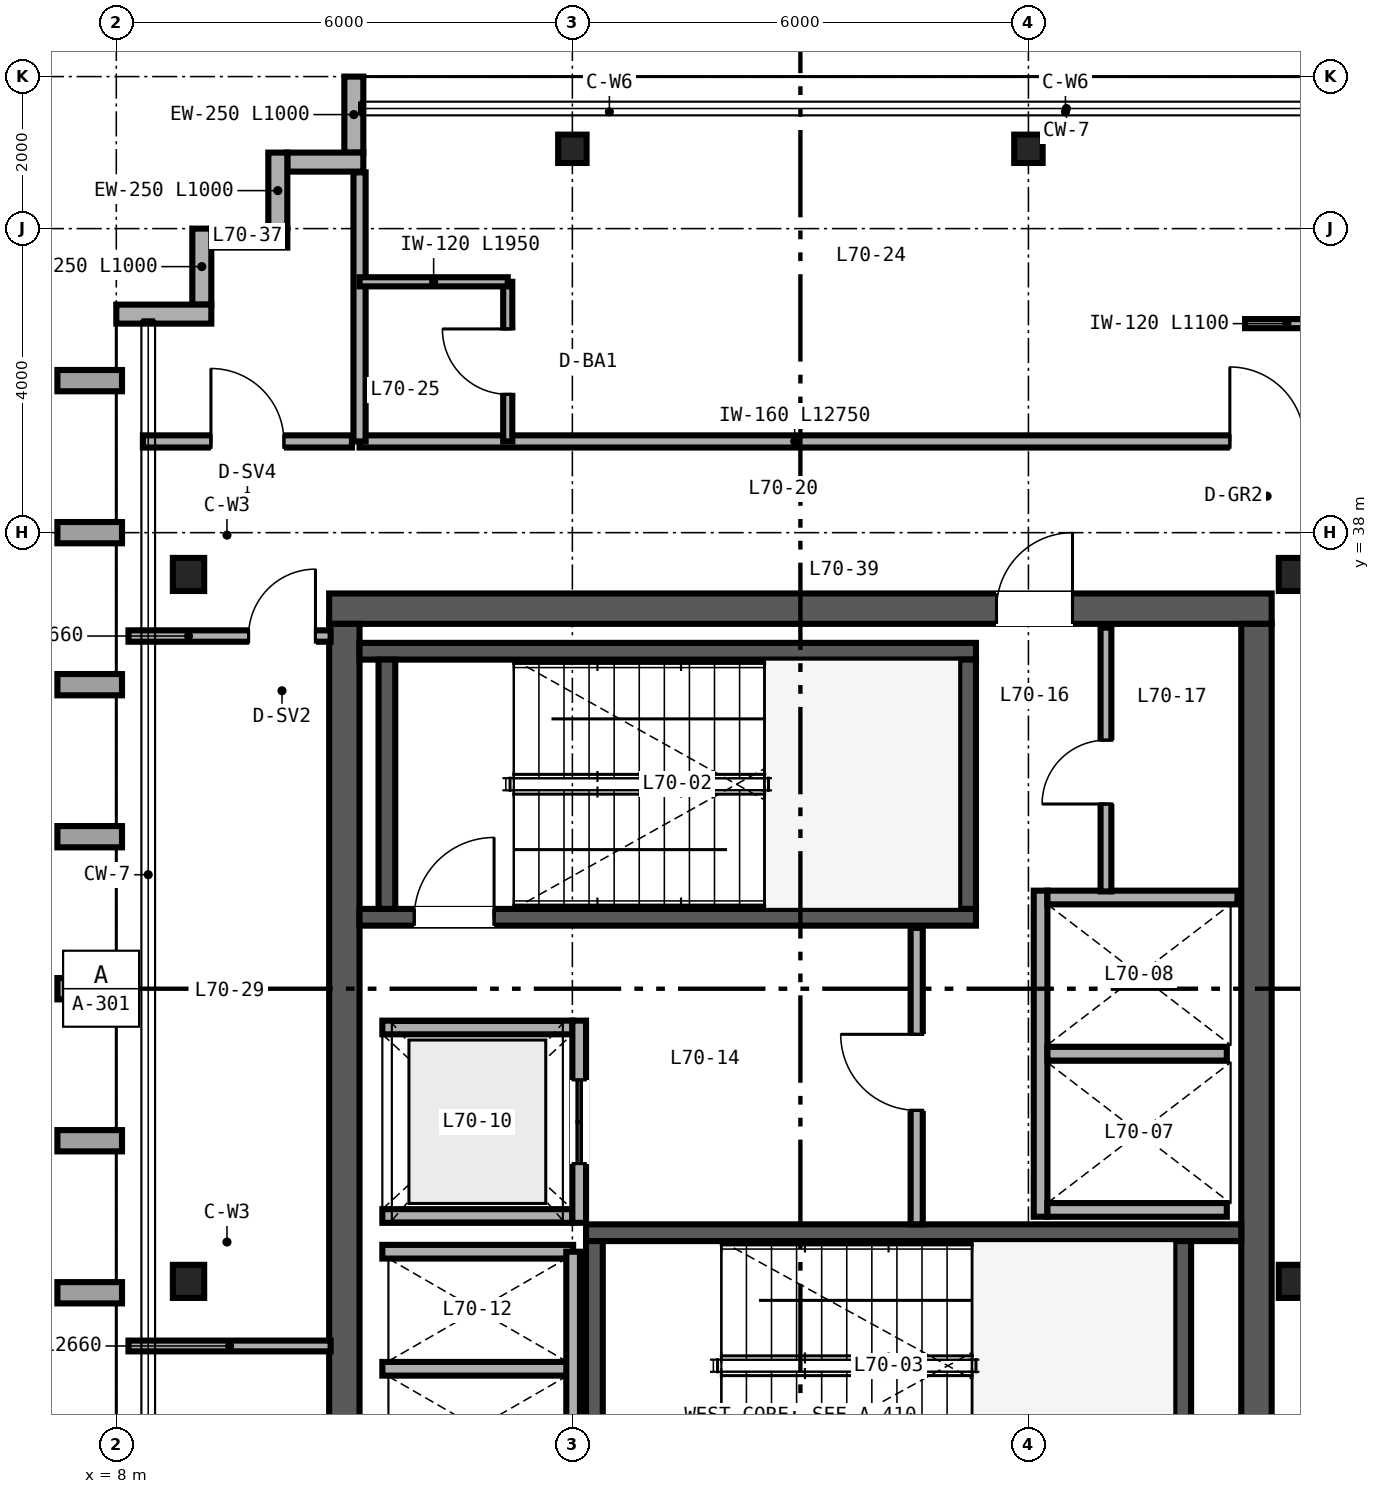
"""IFC4 building model, lengths in metres.
Left out: names, types, materials, properties, quantities, classifications, styles, units other than length and angle.
Written with IfcOpenShell. Run it as: python <this file> out.ifc"""

import sys

from ifc_helpers import new_model, si_unit, direction, frame, frame_2d, origin, origin_2d, place, context, subcontext, project, spatial, rectangle, i_section, extrude, source, transform, mapped, element, fill, save


model = new_model("IFC4")
c1 = context("Model", 3, precision=1e-05, world=origin(), true_north=direction((0.0, 1.0)))
c2 = subcontext(c1, "Body", "Model", "MODEL_VIEW")
j1 = project(units=[si_unit("LENGTHUNIT", "METRE"), si_unit("PLANEANGLEUNIT", "RADIAN")], contexts=[c1])
p1 = place(None, origin())
s1 = spatial("IfcSite", under=j1, at=p1, CompositionType="ELEMENT")
p2 = place(p1, origin())
s2 = spatial("IfcBuilding", under=s1, at=p2, CompositionType="ELEMENT")
p3 = place(p2, frame((0.0, 0.0, 276.0)))
s3 = spatial("IfcBuildingStorey", under=s2, at=p3, CompositionType="ELEMENT", Elevation=276.0)
p4 = place(p3, frame((10.8, 37.0, 0.0), z_axis=(0.0, 0.0, 1.0), x_axis=(1.0, 0.0, 0.0)))
e1 = element("IfcWall", 1, at=p4, inside=s3, PredefinedType="SHEAR", context=c2, shape_type="SweptSolid", body=[
    extrude(rectangle(XDim=12.4, YDim=0.4, at=frame_2d((6.2, 0.0))), origin(), (0.0, 0.0, 1.0), 3.38),
])
p5 = place(p4, frame((8.78, 0.0, 0.0)))
e2 = element("IfcOpeningElement", 2, at=p5, cuts=e1, PredefinedType="OPENING", context=c2, shape_type="SweptSolid", body=[
    extrude(rectangle(XDim=1.0, YDim=2.15, at=frame_2d((0.5, 1.075))), frame((0.0, 0.21, 0.0), z_axis=(0.0, -1.0, 0.0), x_axis=(1.0, 0.0, 0.0)), (0.0, 0.0, 1.0), 0.42),
])
for number, where, z_axis, x_axis in (
    (3, (11.0, 15.2, 0.0), (0.0, 0.0, 1.0), (0.0, 1.0, 0.0)),
    (4, (23.0, 15.2, 0.0), (0.0, 0.0, 1.0), (0.0, 1.0, 0.0)),
):
    element("IfcWall", number, at=place(p3, frame(where, z_axis=z_axis, x_axis=x_axis)), inside=s3, PredefinedType="SHEAR", context=c2, shape_type="SweptSolid", body=[
        extrude(rectangle(XDim=21.6, YDim=0.4, at=frame_2d((10.8, 0.0))), origin(), (0.0, 0.0, 1.0), 3.38),
    ])
p6 = place(p3, frame((11.2, 32.94, 0.0), z_axis=(0.0, 0.0, 1.0), x_axis=(1.0, 0.0, 0.0)))
e5 = element("IfcWall", 5, at=p6, inside=s3, PredefinedType="SHEAR", context=c2, shape_type="SweptSolid", body=[
    extrude(rectangle(XDim=8.11, YDim=0.22, at=frame_2d((4.055, 0.0))), origin(), (0.0, 0.0, 1.0), 3.4),
])
p7 = place(p6, frame((0.72, 0.0, 0.0)))
e6 = element("IfcOpeningElement", 6, at=p7, cuts=e5, PredefinedType="OPENING", context=c2, shape_type="SweptSolid", body=[
    extrude(rectangle(XDim=1.05, YDim=2.15, at=frame_2d((0.525, 1.075))), frame((0.0, 0.12, 0.0), z_axis=(0.0, -1.0, 0.0), x_axis=(1.0, 0.0, 0.0)), (0.0, 0.0, 1.0), 0.24),
])
p8 = place(p3, frame((11.2, 36.44, 0.0), z_axis=(0.0, 0.0, 1.0), x_axis=(1.0, 0.0, 0.0)))
e7 = element("IfcWall", 7, at=p8, inside=s3, PredefinedType="SHEAR", context=c2, shape_type="SweptSolid", body=[
    extrude(rectangle(XDim=8.11, YDim=0.22, at=frame_2d((4.055, 0.0))), origin(), (0.0, 0.0, 1.0), 3.4),
])
for number, where, z_axis, x_axis in (
    (8, (11.56, 33.05, 0.0), (0.0, 0.0, 1.0), (0.0, 1.0, 0.0)),
    (9, (19.2, 33.05, 0.0), (0.0, 0.0, 1.0), (0.0, 1.0, 0.0)),
):
    element("IfcWall", number, at=place(p3, frame(where, z_axis=z_axis, x_axis=x_axis)), inside=s3, PredefinedType="SHEAR", context=c2, shape_type="SweptSolid", body=[
        extrude(rectangle(XDim=3.28, YDim=0.22, at=frame_2d((1.64, 0.0))), origin(), (0.0, 0.0, 1.0), 3.4),
    ])
p9 = place(p3, frame((14.18, 28.79, 0.0), z_axis=(0.0, 0.0, 1.0), x_axis=(1.0, 0.0, 0.0)))
e10 = element("IfcWall", 10, at=p9, inside=s3, PredefinedType="SHEAR", context=c2, shape_type="SweptSolid", body=[
    extrude(rectangle(XDim=8.62, YDim=0.22, at=frame_2d((4.31, 0.0))), origin(), (0.0, 0.0, 1.0), 3.4),
])
for number, where, z_axis, x_axis in (
    (11, (14.29, 25.4, 0.0), (0.0, 0.0, 1.0), (0.0, 1.0, 0.0)),
    (12, (22.03, 25.4, 0.0), (0.0, 0.0, 1.0), (0.0, 1.0, 0.0)),
):
    element("IfcWall", number, at=place(p3, frame(where, z_axis=z_axis, x_axis=x_axis)), inside=s3, PredefinedType="SHEAR", context=c2, shape_type="SweptSolid", body=[
        extrude(rectangle(XDim=3.28, YDim=0.22, at=frame_2d((1.64, 0.0))), origin(), (0.0, 0.0, 1.0), 3.4),
    ])
m1 = source(origin(), c2, "Body", "SweptSolid", [
    extrude(i_section(OverallWidth=0.412, OverallDepth=0.435, WebThickness=0.036, FlangeThickness=0.057, FilletRadius=0.025, at=origin_2d()), origin(), (0.0, 0.0, 1.0), 3.38),
])
for number, where, z_axis, x_axis in (
    (13, (8.95, 28.15, 0.0), (0.0, 0.0, 1.0), (1.0, 0.0, 0.0)),
    (14, (23.5, 28.15, 0.0), (0.0, 0.0, 1.0), (1.0, 0.0, 0.0)),
    (15, (8.95, 37.45, 0.0), (0.0, 0.0, 1.0), (1.0, 0.0, 0.0)),
    (16, (23.5, 37.45, 0.0), (0.0, 0.0, 1.0), (1.0, 0.0, 0.0)),
):
    element("IfcColumn", number, at=place(p3, frame(where, z_axis=z_axis, x_axis=x_axis)), inside=s3, PredefinedType="COLUMN", context=c2, shape_type="MappedRepresentation", body=[
        mapped(m1, transform((0.0, 0.0, 0.0), scale=1.0)),
    ])
m2 = source(origin(), c2, "Body", "SweptSolid", [
    extrude(i_section(OverallWidth=0.374, OverallDepth=0.373, WebThickness=0.016, FlangeThickness=0.026, FilletRadius=0.025, at=origin_2d()), origin(), (0.0, 0.0, 1.0), 3.38),
])
for number, where, z_axis, x_axis in (
    (17, (14.0, 43.05, 0.0), (0.0, 0.0, 1.0), (1.0, 0.0, 0.0)),
    (18, (20.0, 43.05, 0.0), (0.0, 0.0, 1.0), (1.0, 0.0, 0.0)),
):
    element("IfcColumn", number, at=place(p3, frame(where, z_axis=z_axis, x_axis=x_axis)), inside=s3, PredefinedType="COLUMN", context=c2, shape_type="MappedRepresentation", body=[
        mapped(m2, transform((0.0, 0.0, 0.0), scale=1.0)),
    ])
for number, where, z_axis, x_axis in (
    (19, (11.125, 44.0, 0.0), (0.0, 0.0, 1.0), (0.0, -1.0, 0.0)),
    (20, (11.25, 42.875, 0.0), (0.0, 0.0, 1.0), (-1.0, 0.0, 0.0)),
    (21, (10.125, 43.0, 0.0), (0.0, 0.0, 1.0), (0.0, -1.0, 0.0)),
    (22, (10.25, 41.875, 0.0), (0.0, 0.0, 1.0), (-1.0, 0.0, 0.0)),
    (23, (9.125, 42.0, 0.0), (0.0, 0.0, 1.0), (0.0, -1.0, 0.0)),
):
    element("IfcWall", number, at=place(p3, frame(where, z_axis=z_axis, x_axis=x_axis)), inside=s3, PredefinedType="SOLIDWALL", context=c2, shape_type="SweptSolid", body=[
        extrude(rectangle(XDim=1.0, YDim=0.25, at=frame_2d((0.5, 0.0))), origin(), (0.0, 0.0, 1.0), 3.38),
    ])
p10 = place(p3, frame((9.25, 40.875, 0.0), z_axis=(0.0, 0.0, 1.0), x_axis=(-1.0, 0.0, 0.0)))
e24 = element("IfcWall", 24, at=p10, inside=s3, PredefinedType="SOLIDWALL", context=c2, shape_type="SweptSolid", body=[
    extrude(rectangle(XDim=1.25, YDim=0.25, at=frame_2d((0.625, 0.0))), origin(), (0.0, 0.0, 1.0), 3.38),
])
p11 = place(p3, frame((20.16, 29.0, 0.0), z_axis=(0.0, 0.0, 1.0), x_axis=(0.0, 1.0, 0.0)))
e25 = element("IfcWall", 25, at=p11, inside=s3, PredefinedType="SOLIDWALL", context=c2, shape_type="SweptSolid", body=[
    extrude(rectangle(XDim=4.29, YDim=0.18, at=frame_2d((2.145, 0.0))), origin(), (0.0, 0.0, 1.0), 3.38),
])
p12 = place(p3, frame((20.25, 29.09, 0.0), z_axis=(0.0, 0.0, 1.0), x_axis=(1.0, 0.0, 0.0)))
e26 = element("IfcWall", 26, at=p12, inside=s3, PredefinedType="SOLIDWALL", context=c2, shape_type="SweptSolid", body=[
    extrude(rectangle(XDim=2.36, YDim=0.18, at=frame_2d((1.18, 0.0))), origin(), (0.0, 0.0, 1.0), 3.38),
])
p13 = place(p3, frame((20.25, 33.2, 0.0), z_axis=(0.0, 0.0, 1.0), x_axis=(1.0, 0.0, 0.0)))
e27 = element("IfcWall", 27, at=p13, inside=s3, PredefinedType="SOLIDWALL", context=c2, shape_type="SweptSolid", body=[
    extrude(rectangle(XDim=2.5, YDim=0.18, at=frame_2d((1.25, 0.0))), origin(), (0.0, 0.0, 1.0), 3.38),
])
p14 = place(p3, frame((20.25, 31.145, 0.0), z_axis=(0.0, 0.0, 1.0), x_axis=(1.0, 0.0, 0.0)))
e28 = element("IfcWall", 28, at=p14, inside=s3, PredefinedType="SOLIDWALL", context=c2, shape_type="SweptSolid", body=[
    extrude(rectangle(XDim=2.36, YDim=0.18, at=frame_2d((1.18, 0.0))), origin(), (0.0, 0.0, 1.0), 3.38),
])
for number, where, z_axis, x_axis in (
    (29, (11.5, 29.01, 0.0), (0.0, 0.0, 1.0), (1.0, 0.0, 0.0)),
    (30, (11.5, 31.49, 0.0), (0.0, 0.0, 1.0), (1.0, 0.0, 0.0)),
):
    element("IfcWall", number, at=place(p3, frame(where, z_axis=z_axis, x_axis=x_axis)), inside=s3, PredefinedType="SOLIDWALL", context=c2, shape_type="SweptSolid", body=[
        extrude(rectangle(XDim=2.5, YDim=0.18, at=frame_2d((1.25, 0.0))), origin(), (0.0, 0.0, 1.0), 3.38),
    ])
p15 = place(p3, frame((14.09, 28.92, 0.0), z_axis=(0.0, 0.0, 1.0), x_axis=(0.0, 1.0, 0.0)))
e31 = element("IfcWall", 31, at=p15, inside=s3, PredefinedType="SOLIDWALL", context=c2, shape_type="SweptSolid", body=[
    extrude(rectangle(XDim=2.66, YDim=0.18, at=frame_2d((1.33, 0.0))), origin(), (0.0, 0.0, 1.0), 3.38),
])
p16 = place(p15, frame((0.78, 0.0, 0.0)))
e32 = element("IfcOpeningElement", 32, at=p16, cuts=e31, PredefinedType="OPENING", context=c2, shape_type="SweptSolid", body=[
    extrude(rectangle(XDim=1.1, YDim=2.2, at=frame_2d((0.55, 1.1))), frame((0.0, 0.1, 0.0), z_axis=(0.0, -1.0, 0.0), x_axis=(1.0, 0.0, 0.0)), (0.0, 0.0, 1.0), 0.2),
])
for number, where, z_axis, x_axis in (
    (33, (11.5, 27.0, 0.0), (0.0, 0.0, 1.0), (1.0, 0.0, 0.0)),
    (34, (11.5, 28.54, 0.0), (0.0, 0.0, 1.0), (1.0, 0.0, 0.0)),
):
    element("IfcWall", number, at=place(p3, frame(where, z_axis=z_axis, x_axis=x_axis)), inside=s3, PredefinedType="SOLIDWALL", context=c2, shape_type="SweptSolid", body=[
        extrude(rectangle(XDim=2.51, YDim=0.18, at=frame_2d((1.255, 0.0))), origin(), (0.0, 0.0, 1.0), 3.38),
    ])
p17 = place(p3, frame((14.01, 25.46, 0.0), z_axis=(0.0, 0.0, 1.0), x_axis=(0.0, 1.0, 0.0)))
e35 = element("IfcWall", 35, at=p17, inside=s3, PredefinedType="SOLIDWALL", context=c2, shape_type="SweptSolid", body=[
    extrude(rectangle(XDim=3.08, YDim=0.18, at=frame_2d((1.54, 0.0))), origin(), (0.0, 0.0, 1.0), 3.38),
])
p18 = place(p3, frame((18.53, 28.9, 0.0), z_axis=(0.0, 0.0, 1.0), x_axis=(0.0, 1.0, 0.0)))
e36 = element("IfcWall", 36, at=p18, inside=s3, PredefinedType="PARTITIONING", context=c2, shape_type="SweptSolid", body=[
    extrude(rectangle(XDim=3.9, YDim=0.16, at=frame_2d((1.95, 0.0))), origin(), (0.0, 0.0, 1.0), 3.38),
])
p19 = place(p18, frame((1.5, 0.0, 0.0)))
e37 = element("IfcOpeningElement", 37, at=p19, cuts=e36, PredefinedType="OPENING", context=c2, shape_type="SweptSolid", body=[
    extrude(rectangle(XDim=1.0, YDim=2.15, at=frame_2d((0.5, 1.075))), frame((0.0, 0.09, 0.0), z_axis=(0.0, -1.0, 0.0), x_axis=(1.0, 0.0, 0.0)), (0.0, 0.0, 1.0), 0.18),
])
p20 = place(p3, frame((21.02, 33.28, 0.0), z_axis=(0.0, 0.0, 1.0), x_axis=(0.0, 1.0, 0.0)))
e38 = element("IfcWall", 38, at=p20, inside=s3, PredefinedType="PARTITIONING", context=c2, shape_type="SweptSolid", body=[
    extrude(rectangle(XDim=3.47, YDim=0.142, at=frame_2d((1.735, 0.0))), origin(), (0.0, 0.0, 1.0), 3.38),
])
p21 = place(p20, frame((1.15, 0.0, 0.0)))
e39 = element("IfcOpeningElement", 39, at=p21, cuts=e38, PredefinedType="OPENING", context=c2, shape_type="SweptSolid", body=[
    extrude(rectangle(XDim=0.84, YDim=2.1, at=frame_2d((0.42, 1.05))), frame((0.0, 0.081, 0.0), z_axis=(0.0, -1.0, 0.0), x_axis=(1.0, 0.0, 0.0)), (0.0, 0.0, 1.0), 0.162),
])
p22 = place(p3, frame((11.2, 39.2, 0.0), z_axis=(0.0, 0.0, 1.0), x_axis=(1.0, 0.0, 0.0)))
e40 = element("IfcWall", 40, at=p22, inside=s3, PredefinedType="PARTITIONING", context=c2, shape_type="SweptSolid", body=[
    extrude(rectangle(XDim=12.75, YDim=0.16, at=frame_2d((6.375, 0.0))), origin(), (0.0, 0.0, 1.0), 3.38),
])
p23 = place(p22, frame((11.45, 0.0, 0.0)))
e41 = element("IfcOpeningElement", 41, at=p23, cuts=e40, PredefinedType="OPENING", context=c2, shape_type="SweptSolid", body=[
    extrude(rectangle(XDim=0.98, YDim=2.2, at=frame_2d((0.49, 1.1))), frame((0.0, 0.09, 0.0), z_axis=(0.0, -1.0, 0.0), x_axis=(1.0, 0.0, 0.0)), (0.0, 0.0, 1.0), 0.18),
])
p24 = place(p3, frame((11.2, 39.2, 0.0), z_axis=(0.0, 0.0, 1.0), x_axis=(0.0, 1.0, 0.0)))
e42 = element("IfcWall", 42, at=p24, inside=s3, PredefinedType="PARTITIONING", context=c2, shape_type="SweptSolid", body=[
    extrude(rectangle(XDim=3.54, YDim=0.16, at=frame_2d((1.77, 0.0))), origin(), (0.0, 0.0, 1.0), 3.38),
])
p25 = place(p3, frame((13.15, 39.2, 0.0), z_axis=(0.0, 0.0, 1.0), x_axis=(0.0, 1.0, 0.0)))
e43 = element("IfcWall", 43, at=p25, inside=s3, PredefinedType="PARTITIONING", context=c2, shape_type="SweptSolid", body=[
    extrude(rectangle(XDim=2.1, YDim=0.12, at=frame_2d((1.05, 0.0))), origin(), (0.0, 0.0, 1.0), 3.38),
])
p26 = place(p25, frame((0.62, 0.0, 0.0)))
e44 = element("IfcOpeningElement", 44, at=p26, cuts=e43, PredefinedType="OPENING", context=c2, shape_type="SweptSolid", body=[
    extrude(rectangle(XDim=0.86, YDim=2.1, at=frame_2d((0.43, 1.05))), frame((0.0, 0.07, 0.0), z_axis=(0.0, -1.0, 0.0), x_axis=(1.0, 0.0, 0.0)), (0.0, 0.0, 1.0), 0.14),
])
p27 = place(p3, frame((11.2, 41.3, 0.0), z_axis=(0.0, 0.0, 1.0), x_axis=(1.0, 0.0, 0.0)))
e45 = element("IfcWall", 45, at=p27, inside=s3, PredefinedType="PARTITIONING", context=c2, shape_type="SweptSolid", body=[
    extrude(rectangle(XDim=1.95, YDim=0.12, at=frame_2d((0.975, 0.0))), origin(), (0.0, 0.0, 1.0), 3.38),
])
p28 = place(p3, frame((22.85, 40.75, 0.0), z_axis=(0.0, 0.0, 1.0), x_axis=(1.0, 0.0, 0.0)))
e46 = element("IfcWall", 46, at=p28, inside=s3, PredefinedType="PARTITIONING", context=c2, shape_type="SweptSolid", body=[
    extrude(rectangle(XDim=1.1, YDim=0.12, at=frame_2d((0.55, 0.0))), origin(), (0.0, 0.0, 1.0), 3.38),
])
p29 = place(p3, frame((8.16, 36.64, 0.0), z_axis=(0.0, 0.0, 1.0), x_axis=(1.0, 0.0, 0.0)))
e47 = element("IfcWall", 47, at=p29, inside=s3, PredefinedType="PARTITIONING", context=c2, shape_type="SweptSolid", body=[
    extrude(rectangle(XDim=2.66, YDim=0.15, at=frame_2d((1.33, 0.0))), origin(), (0.0, 0.0, 1.0), 2.763),
])
p30 = place(p29, frame((1.58, 0.0, 0.0)))
e48 = element("IfcOpeningElement", 48, at=p30, cuts=e47, PredefinedType="OPENING", context=c2, shape_type="SweptSolid", body=[
    extrude(rectangle(XDim=0.88, YDim=2.15, at=frame_2d((0.44, 1.075))), frame((0.0, 0.085, 0.0), z_axis=(0.0, -1.0, 0.0), x_axis=(1.0, 0.0, 0.0)), (0.0, 0.0, 1.0), 0.17),
])
p31 = place(p3, frame((8.16, 27.3, 0.0), z_axis=(0.0, 0.0, 1.0), x_axis=(1.0, 0.0, 0.0)))
e49 = element("IfcWall", 49, at=p31, inside=s3, PredefinedType="PARTITIONING", context=c2, shape_type="SweptSolid", body=[
    extrude(rectangle(XDim=2.66, YDim=0.142, at=frame_2d((1.33, 0.0))), origin(), (0.0, 0.0, 1.0), 2.601),
])
p32 = place(p3, frame((8.35, 39.2, 0.0), z_axis=(0.0, 0.0, 1.0), x_axis=(1.0, 0.0, 0.0)))
e50 = element("IfcWall", 50, at=p32, inside=s3, PredefinedType="PARTITIONING", context=c2, shape_type="SweptSolid", body=[
    extrude(rectangle(XDim=2.75, YDim=0.16, at=frame_2d((1.375, 0.0))), origin(), (0.0, 0.0, 1.0), 3.38),
])
p33 = place(p32, frame((0.895, 0.0, 0.0)))
e51 = element("IfcOpeningElement", 51, at=p33, cuts=e50, PredefinedType="OPENING", context=c2, shape_type="SweptSolid", body=[
    extrude(rectangle(XDim=0.96, YDim=2.15, at=frame_2d((0.48, 1.075))), frame((0.0, 0.09, 0.0), z_axis=(0.0, -1.0, 0.0), x_axis=(1.0, 0.0, 0.0)), (0.0, 0.0, 1.0), 0.18),
])
m3 = source(origin(), c2, "Body", "SweptSolid", [
    extrude(rectangle(XDim=1.05, YDim=2.15, at=frame_2d((0.525, 1.075))), frame((0.0, 0.025, 0.0), z_axis=(0.0, -1.0, 0.0), x_axis=(1.0, 0.0, 0.0)), (0.0, 0.0, 1.0), 0.05),
])
p34 = place(p7, origin())
e52 = element("IfcDoor", 52, at=p34, inside=s3, OperationType="SINGLE_SWING_RIGHT", PredefinedType="DOOR", context=c2, shape_type="MappedRepresentation", body=[
    mapped(m3, transform((0.0, 0.0, 0.0), scale=1.0)),
])
fill(e6, e52)
m4 = source(origin(), c2, "Body", "SweptSolid", [
    extrude(rectangle(XDim=1.1, YDim=2.2, at=frame_2d((0.55, 1.1))), frame((0.0, 0.025, 0.0), z_axis=(0.0, -1.0, 0.0), x_axis=(1.0, 0.0, 0.0)), (0.0, 0.0, 1.0), 0.05),
])
p35 = place(p16, origin())
e53 = element("IfcDoor", 53, at=p35, inside=s3, OperationType="DOUBLE_DOOR_SLIDING", PredefinedType="DOOR", context=c2, shape_type="MappedRepresentation", body=[
    mapped(m4, transform((0.0, 0.0, 0.0), scale=1.0)),
])
fill(e32, e53)
m5 = source(origin(), c2, "Body", "SweptSolid", [
    extrude(rectangle(XDim=1.0, YDim=2.15, at=frame_2d((0.5, 1.075))), frame((0.0, 0.025, 0.0), z_axis=(0.0, -1.0, 0.0), x_axis=(1.0, 0.0, 0.0)), (0.0, 0.0, 1.0), 0.05),
])
p36 = place(p19, origin())
e54 = element("IfcDoor", 54, at=p36, inside=s3, OperationType="SINGLE_SWING_RIGHT", PredefinedType="DOOR", context=c2, shape_type="MappedRepresentation", body=[
    mapped(m5, transform((0.0, 0.0, 0.0), scale=1.0)),
])
fill(e37, e54)
m6 = source(origin(), c2, "Body", "SweptSolid", [
    extrude(rectangle(XDim=0.84, YDim=2.1, at=frame_2d((0.42, 1.05))), frame((0.0, 0.025, 0.0), z_axis=(0.0, -1.0, 0.0), x_axis=(1.0, 0.0, 0.0)), (0.0, 0.0, 1.0), 0.05),
])
p37 = place(p21, origin())
e55 = element("IfcDoor", 55, at=p37, inside=s3, OperationType="SINGLE_SWING_LEFT", PredefinedType="DOOR", context=c2, shape_type="MappedRepresentation", body=[
    mapped(m6, transform((0.0, 0.0, 0.0), scale=1.0)),
])
fill(e39, e55)
p38 = place(p5, origin())
e56 = element("IfcDoor", 56, at=p38, inside=s3, OperationType="SINGLE_SWING_RIGHT", PredefinedType="DOOR", context=c2, shape_type="MappedRepresentation", body=[
    mapped(m5, transform((0.0, 0.0, 0.0), scale=1.0)),
])
fill(e2, e56)
m7 = source(origin(), c2, "Body", "SweptSolid", [
    extrude(rectangle(XDim=0.86, YDim=2.1, at=frame_2d((0.43, 1.05))), frame((0.0, 0.025, 0.0), z_axis=(0.0, -1.0, 0.0), x_axis=(1.0, 0.0, 0.0)), (0.0, 0.0, 1.0), 0.05),
])
p39 = place(p26, origin())
e57 = element("IfcDoor", 57, at=p39, inside=s3, OperationType="SINGLE_SWING_RIGHT", PredefinedType="DOOR", context=c2, shape_type="MappedRepresentation", body=[
    mapped(m7, transform((0.0, 0.0, 0.0), scale=1.0)),
])
fill(e44, e57)
m8 = source(origin(), c2, "Body", "SweptSolid", [
    extrude(rectangle(XDim=0.98, YDim=2.2, at=frame_2d((0.49, 1.1))), frame((0.0, 0.025, 0.0), z_axis=(0.0, -1.0, 0.0), x_axis=(1.0, 0.0, 0.0)), (0.0, 0.0, 1.0), 0.05),
])
p40 = place(p23, origin())
e58 = element("IfcDoor", 58, at=p40, inside=s3, OperationType="SINGLE_SWING_LEFT", PredefinedType="DOOR", context=c2, shape_type="MappedRepresentation", body=[
    mapped(m8, transform((0.0, 0.0, 0.0), scale=1.0)),
])
fill(e41, e58)
m9 = source(origin(), c2, "Body", "SweptSolid", [
    extrude(rectangle(XDim=0.88, YDim=2.15, at=frame_2d((0.44, 1.075))), frame((0.0, 0.025, 0.0), z_axis=(0.0, -1.0, 0.0), x_axis=(1.0, 0.0, 0.0)), (0.0, 0.0, 1.0), 0.05),
])
p41 = place(p30, origin())
e59 = element("IfcDoor", 59, at=p41, inside=s3, OperationType="SINGLE_SWING_RIGHT", PredefinedType="DOOR", context=c2, shape_type="MappedRepresentation", body=[
    mapped(m9, transform((0.0, 0.0, 0.0), scale=1.0)),
])
fill(e48, e59)
m10 = source(origin(), c2, "Body", "SweptSolid", [
    extrude(rectangle(XDim=0.96, YDim=2.15, at=frame_2d((0.48, 1.075))), frame((0.0, 0.025, 0.0), z_axis=(0.0, -1.0, 0.0), x_axis=(1.0, 0.0, 0.0)), (0.0, 0.0, 1.0), 0.05),
])
p42 = place(p33, origin())
e60 = element("IfcDoor", 60, at=p42, inside=s3, OperationType="SINGLE_SWING_LEFT", PredefinedType="DOOR", context=c2, shape_type="MappedRepresentation", body=[
    mapped(m10, transform((0.0, 0.0, 0.0), scale=1.0)),
])
fill(e51, e60)
save(model, sys.argv[1])
